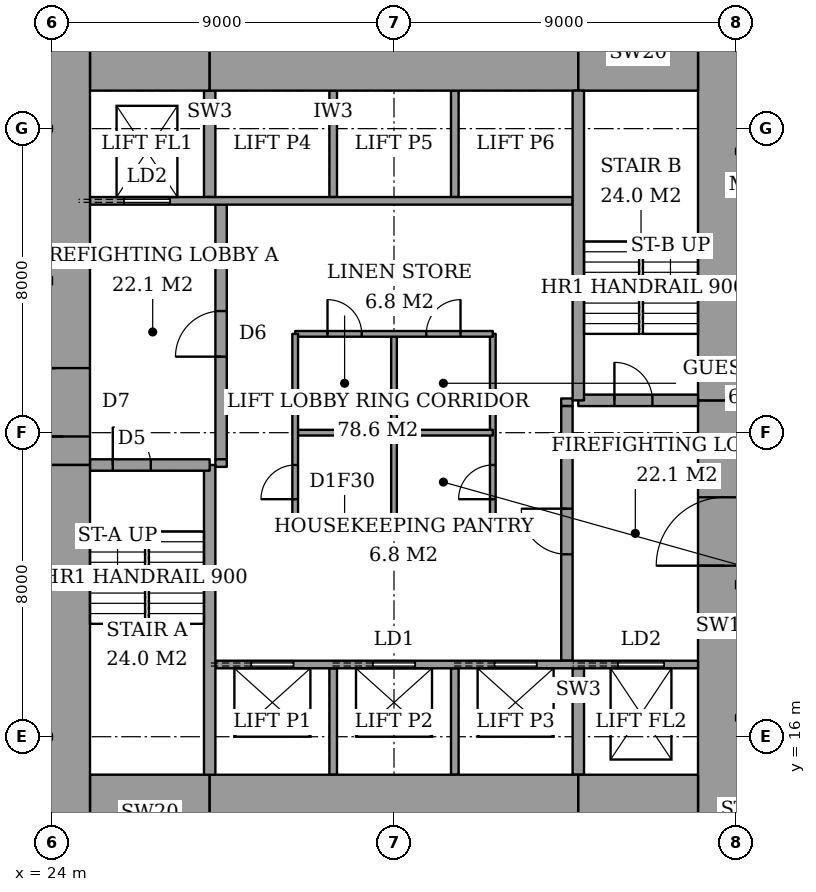
"""IFC4 building model, lengths in metres.
Left out: names, types, materials, properties, quantities, classifications, styles, units other than length and angle.
Written with IfcOpenShell. Run it as: python <this file> out.ifc"""

import sys

from ifc_helpers import new_model, si_unit, direction, frame, frame_2d, origin, place, context, subcontext, project, spatial, rectangle, extrude, element, fill, save


model = new_model("IFC4")
c1 = context("Model", 3, precision=1e-05, world=origin(), true_north=direction((0.0, 1.0)))
c2 = subcontext(c1, "Body", "Model", "MODEL_VIEW")
j1 = project(units=[si_unit("LENGTHUNIT", "METRE"), si_unit("PLANEANGLEUNIT", "RADIAN")], contexts=[c1])
p1 = place(None, origin())
s1 = spatial("IfcSite", under=j1, at=p1, CompositionType="ELEMENT")
p2 = place(p1, origin())
s2 = spatial("IfcBuilding", under=s1, at=p2, CompositionType="ELEMENT")
p3 = place(p2, frame((0.0, 0.0, 139.4)))
s3 = spatial("IfcBuildingStorey", under=s2, at=p3, CompositionType="ELEMENT", Elevation=139.4)
p4 = place(p3, frame((25.0, 14.0, 0.0), z_axis=(0.0, 0.0, 1.0), x_axis=(1.0, 0.0, 0.0)))
e1 = element("IfcWall", 1, at=p4, inside=s3, PredefinedType="SHEAR", context=c2, shape_type="SweptSolid", body=[
    extrude(rectangle(XDim=3.15, YDim=2.0, at=frame_2d((1.575, 0.0))), origin(), (0.0, 0.0, 1.0), 3.6),
])
p5 = place(p3, frame((28.15, 14.0, 0.0), z_axis=(0.0, 0.0, 1.0), x_axis=(1.0, 0.0, 0.0)))
e2 = element("IfcWall", 2, at=p5, inside=s3, PredefinedType="SHEAR", context=c2, shape_type="SweptSolid", body=[
    extrude(rectangle(XDim=9.7, YDim=2.0, at=frame_2d((4.85, 0.0))), origin(), (0.0, 0.0, 1.0), 3.6),
])
for number, where, z_axis, x_axis in (
    (3, (37.85, 14.0, 0.0), (0.0, 0.0, 1.0), (1.0, 0.0, 0.0)),
    (4, (25.0, 34.0, 0.0), (0.0, 0.0, 1.0), (1.0, 0.0, 0.0)),
):
    element("IfcWall", number, at=place(p3, frame(where, z_axis=z_axis, x_axis=x_axis)), inside=s3, PredefinedType="SHEAR", context=c2, shape_type="SweptSolid", body=[
        extrude(rectangle(XDim=3.15, YDim=2.0, at=frame_2d((1.575, 0.0))), origin(), (0.0, 0.0, 1.0), 3.6),
    ])
p6 = place(p3, frame((28.15, 34.0, 0.0), z_axis=(0.0, 0.0, 1.0), x_axis=(1.0, 0.0, 0.0)))
e5 = element("IfcWall", 5, at=p6, inside=s3, PredefinedType="SHEAR", context=c2, shape_type="SweptSolid", body=[
    extrude(rectangle(XDim=9.7, YDim=2.0, at=frame_2d((4.85, 0.0))), origin(), (0.0, 0.0, 1.0), 3.6),
])
p7 = place(p3, frame((37.85, 34.0, 0.0), z_axis=(0.0, 0.0, 1.0), x_axis=(1.0, 0.0, 0.0)))
e6 = element("IfcWall", 6, at=p7, inside=s3, PredefinedType="SHEAR", context=c2, shape_type="SweptSolid", body=[
    extrude(rectangle(XDim=3.15, YDim=2.0, at=frame_2d((1.575, 0.0))), origin(), (0.0, 0.0, 1.0), 3.6),
])
p8 = place(p3, frame((24.3, 13.0, 0.0), z_axis=(0.0, 0.0, 1.0), x_axis=(0.0, 1.0, 0.0)))
e7 = element("IfcWall", 7, at=p8, inside=s3, PredefinedType="SHEAR", context=c2, shape_type="SweptSolid", body=[
    extrude(rectangle(XDim=10.15, YDim=1.4, at=frame_2d((5.075, 0.0))), origin(), (0.0, 0.0, 1.0), 3.6),
])
p9 = place(p3, frame((24.3, 23.15, 0.0), z_axis=(0.0, 0.0, 1.0), x_axis=(0.0, 1.0, 0.0)))
e8 = element("IfcWall", 8, at=p9, inside=s3, PredefinedType="SHEAR", context=c2, shape_type="SweptSolid", body=[
    extrude(rectangle(XDim=11.85, YDim=1.4, at=frame_2d((5.925, 0.0))), origin(), (0.0, 0.0, 1.0), 3.6),
])
p10 = place(p9, frame((0.75, 0.0, 0.0)))
e9 = element("IfcOpeningElement", 9, at=p10, cuts=e8, PredefinedType="OPENING", context=c2, shape_type="SweptSolid", body=[
    extrude(rectangle(XDim=1.8, YDim=2.4, at=frame_2d((0.9, 1.2))), frame((0.0, 0.71, 0.0), z_axis=(0.0, -1.0, 0.0), x_axis=(1.0, 0.0, 0.0)), (0.0, 0.0, 1.0), 1.42),
])
p11 = place(p3, frame((41.7, 13.0, 0.0), z_axis=(0.0, 0.0, 1.0), x_axis=(0.0, 1.0, 0.0)))
e10 = element("IfcWall", 10, at=p11, inside=s3, PredefinedType="SHEAR", context=c2, shape_type="SweptSolid", body=[
    extrude(rectangle(XDim=11.85, YDim=1.4, at=frame_2d((5.925, 0.0))), origin(), (0.0, 0.0, 1.0), 3.6),
])
p12 = place(p11, frame((7.5, 0.0, 0.0)))
e11 = element("IfcOpeningElement", 11, at=p12, cuts=e10, PredefinedType="OPENING", context=c2, shape_type="SweptSolid", body=[
    extrude(rectangle(XDim=1.8, YDim=2.4, at=frame_2d((0.9, 1.2))), frame((0.0, 0.71, 0.0), z_axis=(0.0, -1.0, 0.0), x_axis=(1.0, 0.0, 0.0)), (0.0, 0.0, 1.0), 1.42),
])
p13 = place(p3, frame((41.7, 24.85, 0.0), z_axis=(0.0, 0.0, 1.0), x_axis=(0.0, 1.0, 0.0)))
e12 = element("IfcWall", 12, at=p13, inside=s3, PredefinedType="SHEAR", context=c2, shape_type="SweptSolid", body=[
    extrude(rectangle(XDim=10.15, YDim=1.4, at=frame_2d((5.075, 0.0))), origin(), (0.0, 0.0, 1.0), 3.6),
])
p14 = place(p3, frame((28.15, 15.0, 0.0), z_axis=(0.0, 0.0, 1.0), x_axis=(0.0, 1.0, 0.0)))
e13 = element("IfcWall", 13, at=p14, inside=s3, PredefinedType="SHEAR", context=c2, shape_type="SweptSolid", body=[
    extrude(rectangle(XDim=8.15, YDim=0.3, at=frame_2d((4.075, 0.0))), origin(), (0.0, 0.0, 1.0), 3.6),
])
p15 = place(p3, frame((25.0, 23.15, 0.0), z_axis=(0.0, 0.0, 1.0), x_axis=(1.0, 0.0, 0.0)))
e14 = element("IfcWall", 14, at=p15, inside=s3, PredefinedType="SHEAR", context=c2, shape_type="SweptSolid", body=[
    extrude(rectangle(XDim=3.15, YDim=0.3, at=frame_2d((1.575, 0.0))), origin(), (0.0, 0.0, 1.0), 3.6),
])
p16 = place(p15, frame((0.6, 0.0, 0.0)))
e15 = element("IfcOpeningElement", 15, at=p16, cuts=e14, PredefinedType="OPENING", context=c2, shape_type="SweptSolid", body=[
    extrude(rectangle(XDim=1.0, YDim=2.1, at=frame_2d((0.5, 1.05))), frame((0.0, 0.16, 0.0), z_axis=(0.0, -1.0, 0.0), x_axis=(1.0, 0.0, 0.0)), (0.0, 0.0, 1.0), 0.32),
])
p17 = place(p3, frame((37.85, 24.85, 0.0), z_axis=(0.0, 0.0, 1.0), x_axis=(0.0, 1.0, 0.0)))
e16 = element("IfcWall", 16, at=p17, inside=s3, PredefinedType="SHEAR", context=c2, shape_type="SweptSolid", body=[
    extrude(rectangle(XDim=8.15, YDim=0.3, at=frame_2d((4.075, 0.0))), origin(), (0.0, 0.0, 1.0), 3.6),
])
p18 = place(p3, frame((37.85, 24.85, 0.0), z_axis=(0.0, 0.0, 1.0), x_axis=(1.0, 0.0, 0.0)))
e17 = element("IfcWall", 17, at=p18, inside=s3, PredefinedType="SHEAR", context=c2, shape_type="SweptSolid", body=[
    extrude(rectangle(XDim=3.15, YDim=0.3, at=frame_2d((1.575, 0.0))), origin(), (0.0, 0.0, 1.0), 3.6),
])
p19 = place(p18, frame((0.95, 0.0, 0.0)))
e18 = element("IfcOpeningElement", 18, at=p19, cuts=e17, PredefinedType="OPENING", context=c2, shape_type="SweptSolid", body=[
    extrude(rectangle(XDim=1.0, YDim=2.1, at=frame_2d((0.5, 1.05))), frame((0.0, 0.16, 0.0), z_axis=(0.0, -1.0, 0.0), x_axis=(1.0, 0.0, 0.0)), (0.0, 0.0, 1.0), 0.32),
])
p20 = place(p3, frame((28.45, 23.3, 0.0), z_axis=(0.0, 0.0, 1.0), x_axis=(0.0, 1.0, 0.0)))
e19 = element("IfcWall", 19, at=p20, inside=s3, PredefinedType="PARTITIONING", context=c2, shape_type="SweptSolid", body=[
    extrude(rectangle(XDim=6.7, YDim=0.3, at=frame_2d((3.35, 0.0))), origin(), (0.0, 0.0, 1.0), 3.6),
])
p21 = place(p20, frame((2.7, 0.0, 0.0)))
e20 = element("IfcOpeningElement", 20, at=p21, cuts=e19, PredefinedType="OPENING", context=c2, shape_type="SweptSolid", body=[
    extrude(rectangle(XDim=1.2, YDim=2.1, at=frame_2d((0.6, 1.05))), frame((0.0, 0.16, 0.0), z_axis=(0.0, -1.0, 0.0), x_axis=(1.0, 0.0, 0.0)), (0.0, 0.0, 1.0), 0.32),
])
p22 = place(p3, frame((37.55, 18.0, 0.0), z_axis=(0.0, 0.0, 1.0), x_axis=(0.0, 1.0, 0.0)))
e21 = element("IfcWall", 21, at=p22, inside=s3, PredefinedType="PARTITIONING", context=c2, shape_type="SweptSolid", body=[
    extrude(rectangle(XDim=6.7, YDim=0.3, at=frame_2d((3.35, 0.0))), origin(), (0.0, 0.0, 1.0), 3.6),
])
p23 = place(p22, frame((2.8, 0.0, 0.0)))
e22 = element("IfcOpeningElement", 22, at=p23, cuts=e21, PredefinedType="OPENING", context=c2, shape_type="SweptSolid", body=[
    extrude(rectangle(XDim=1.2, YDim=2.1, at=frame_2d((0.6, 1.05))), frame((0.0, 0.16, 0.0), z_axis=(0.0, -1.0, 0.0), x_axis=(1.0, 0.0, 0.0)), (0.0, 0.0, 1.0), 0.32),
])
p24 = place(p3, frame((28.3, 17.9, 0.0), z_axis=(0.0, 0.0, 1.0), x_axis=(1.0, 0.0, 0.0)))
e23 = element("IfcWall", 23, at=p24, inside=s3, PredefinedType="PARTITIONING", context=c2, shape_type="SweptSolid", body=[
    extrude(rectangle(XDim=12.7, YDim=0.2, at=frame_2d((6.35, 0.0))), origin(), (0.0, 0.0, 1.0), 3.6),
])
p25 = place(p24, frame((0.95, 0.0, 0.0)))
e24 = element("IfcOpeningElement", 24, at=p25, cuts=e23, PredefinedType="OPENING", context=c2, shape_type="SweptSolid", body=[
    extrude(rectangle(XDim=1.1, YDim=2.1, at=frame_2d((0.55, 1.05))), frame((0.0, 0.11, 0.0), z_axis=(0.0, -1.0, 0.0), x_axis=(1.0, 0.0, 0.0)), (0.0, 0.0, 1.0), 0.22),
])
p26 = place(p24, frame((4.15, 0.0, 0.0)))
e25 = element("IfcOpeningElement", 25, at=p26, cuts=e23, PredefinedType="OPENING", context=c2, shape_type="SweptSolid", body=[
    extrude(rectangle(XDim=1.1, YDim=2.1, at=frame_2d((0.55, 1.05))), frame((0.0, 0.11, 0.0), z_axis=(0.0, -1.0, 0.0), x_axis=(1.0, 0.0, 0.0)), (0.0, 0.0, 1.0), 0.22),
])
p27 = place(p24, frame((7.35, 0.0, 0.0)))
e26 = element("IfcOpeningElement", 26, at=p27, cuts=e23, PredefinedType="OPENING", context=c2, shape_type="SweptSolid", body=[
    extrude(rectangle(XDim=1.1, YDim=2.1, at=frame_2d((0.55, 1.05))), frame((0.0, 0.11, 0.0), z_axis=(0.0, -1.0, 0.0), x_axis=(1.0, 0.0, 0.0)), (0.0, 0.0, 1.0), 0.22),
])
p28 = place(p24, frame((10.6, 0.0, 0.0)))
e27 = element("IfcOpeningElement", 27, at=p28, cuts=e23, PredefinedType="OPENING", context=c2, shape_type="SweptSolid", body=[
    extrude(rectangle(XDim=1.2, YDim=2.1, at=frame_2d((0.6, 1.05))), frame((0.0, 0.11, 0.0), z_axis=(0.0, -1.0, 0.0), x_axis=(1.0, 0.0, 0.0)), (0.0, 0.0, 1.0), 0.22),
])
p29 = place(p3, frame((25.0, 30.1, 0.0), z_axis=(0.0, 0.0, 1.0), x_axis=(1.0, 0.0, 0.0)))
e28 = element("IfcWall", 28, at=p29, inside=s3, PredefinedType="PARTITIONING", context=c2, shape_type="SweptSolid", body=[
    extrude(rectangle(XDim=12.7, YDim=0.2, at=frame_2d((6.35, 0.0))), origin(), (0.0, 0.0, 1.0), 3.6),
])
p30 = place(p29, frame((0.9, 0.0, 0.0)))
e29 = element("IfcOpeningElement", 29, at=p30, cuts=e28, PredefinedType="OPENING", context=c2, shape_type="SweptSolid", body=[
    extrude(rectangle(XDim=1.2, YDim=2.1, at=frame_2d((0.6, 1.05))), frame((0.0, 0.11, 0.0), z_axis=(0.0, -1.0, 0.0), x_axis=(1.0, 0.0, 0.0)), (0.0, 0.0, 1.0), 0.22),
])
for number, where, z_axis, x_axis in (
    (30, (31.4, 15.0, 0.0), (0.0, 0.0, 1.0), (0.0, 1.0, 0.0)),
    (31, (34.6, 15.0, 0.0), (0.0, 0.0, 1.0), (0.0, 1.0, 0.0)),
):
    element("IfcWall", number, at=place(p3, frame(where, z_axis=z_axis, x_axis=x_axis)), inside=s3, PredefinedType="PARTITIONING", context=c2, shape_type="SweptSolid", body=[
        extrude(rectangle(XDim=2.8, YDim=0.2, at=frame_2d((1.4, 0.0))), origin(), (0.0, 0.0, 1.0), 3.6),
    ])
p31 = place(p3, frame((37.85, 15.0, 0.0), z_axis=(0.0, 0.0, 1.0), x_axis=(0.0, 1.0, 0.0)))
e32 = element("IfcWall", 32, at=p31, inside=s3, PredefinedType="SHEAR", context=c2, shape_type="SweptSolid", body=[
    extrude(rectangle(XDim=2.8, YDim=0.3, at=frame_2d((1.4, 0.0))), origin(), (0.0, 0.0, 1.0), 3.6),
])
for number, where, z_axis, x_axis in (
    (33, (31.4, 30.2, 0.0), (0.0, 0.0, 1.0), (0.0, 1.0, 0.0)),
    (34, (34.6, 30.2, 0.0), (0.0, 0.0, 1.0), (0.0, 1.0, 0.0)),
):
    element("IfcWall", number, at=place(p3, frame(where, z_axis=z_axis, x_axis=x_axis)), inside=s3, PredefinedType="PARTITIONING", context=c2, shape_type="SweptSolid", body=[
        extrude(rectangle(XDim=2.8, YDim=0.2, at=frame_2d((1.4, 0.0))), origin(), (0.0, 0.0, 1.0), 3.6),
    ])
p32 = place(p3, frame((28.15, 30.2, 0.0), z_axis=(0.0, 0.0, 1.0), x_axis=(0.0, 1.0, 0.0)))
e35 = element("IfcWall", 35, at=p32, inside=s3, PredefinedType="SHEAR", context=c2, shape_type="SweptSolid", body=[
    extrude(rectangle(XDim=2.8, YDim=0.3, at=frame_2d((1.4, 0.0))), origin(), (0.0, 0.0, 1.0), 3.6),
])
for number, where, z_axis, x_axis in (
    (36, (28.3, 23.2, 0.0), (0.0, 0.0, 1.0), (1.0, 0.0, 0.0)),
    (37, (37.4, 24.8, 0.0), (0.0, 0.0, 1.0), (1.0, 0.0, 0.0)),
):
    element("IfcWall", number, at=place(p3, frame(where, z_axis=z_axis, x_axis=x_axis)), inside=s3, PredefinedType="PARTITIONING", context=c2, shape_type="SweptSolid", body=[
        extrude(rectangle(XDim=0.3, YDim=0.2, at=frame_2d((0.15, 0.0))), origin(), (0.0, 0.0, 1.0), 3.6),
    ])
p33 = place(p3, frame((30.4, 21.4, 0.0), z_axis=(0.0, 0.0, 1.0), x_axis=(1.0, 0.0, 0.0)))
e38 = element("IfcWall", 38, at=p33, inside=s3, PredefinedType="PARTITIONING", context=c2, shape_type="SweptSolid", body=[
    extrude(rectangle(XDim=5.2, YDim=0.15, at=frame_2d((2.6, 0.0))), origin(), (0.0, 0.0, 1.0), 3.35),
])
p34 = place(p3, frame((30.4, 26.6, 0.0), z_axis=(0.0, 0.0, 1.0), x_axis=(1.0, 0.0, 0.0)))
e39 = element("IfcWall", 39, at=p34, inside=s3, PredefinedType="PARTITIONING", context=c2, shape_type="SweptSolid", body=[
    extrude(rectangle(XDim=5.2, YDim=0.15, at=frame_2d((2.6, 0.0))), origin(), (0.0, 0.0, 1.0), 3.35),
])
p35 = place(p34, frame((0.85, 0.0, 0.0)))
e40 = element("IfcOpeningElement", 40, at=p35, cuts=e39, PredefinedType="OPENING", context=c2, shape_type="SweptSolid", body=[
    extrude(rectangle(XDim=0.9, YDim=2.1, at=frame_2d((0.45, 1.05))), frame((0.0, 0.085, 0.0), z_axis=(0.0, -1.0, 0.0), x_axis=(1.0, 0.0, 0.0)), (0.0, 0.0, 1.0), 0.17),
])
p36 = place(p34, frame((3.45, 0.0, 0.0)))
e41 = element("IfcOpeningElement", 41, at=p36, cuts=e39, PredefinedType="OPENING", context=c2, shape_type="SweptSolid", body=[
    extrude(rectangle(XDim=0.9, YDim=2.1, at=frame_2d((0.45, 1.05))), frame((0.0, 0.085, 0.0), z_axis=(0.0, -1.0, 0.0), x_axis=(1.0, 0.0, 0.0)), (0.0, 0.0, 1.0), 0.17),
])
p37 = place(p3, frame((30.4, 21.4, 0.0), z_axis=(0.0, 0.0, 1.0), x_axis=(0.0, 1.0, 0.0)))
e42 = element("IfcWall", 42, at=p37, inside=s3, PredefinedType="PARTITIONING", context=c2, shape_type="SweptSolid", body=[
    extrude(rectangle(XDim=5.2, YDim=0.15, at=frame_2d((2.6, 0.0))), origin(), (0.0, 0.0, 1.0), 3.35),
])
p38 = place(p37, frame((0.85, 0.0, 0.0)))
e43 = element("IfcOpeningElement", 43, at=p38, cuts=e42, PredefinedType="OPENING", context=c2, shape_type="SweptSolid", body=[
    extrude(rectangle(XDim=0.9, YDim=2.1, at=frame_2d((0.45, 1.05))), frame((0.0, 0.085, 0.0), z_axis=(0.0, -1.0, 0.0), x_axis=(1.0, 0.0, 0.0)), (0.0, 0.0, 1.0), 0.17),
])
p39 = place(p3, frame((35.6, 21.4, 0.0), z_axis=(0.0, 0.0, 1.0), x_axis=(0.0, 1.0, 0.0)))
e44 = element("IfcWall", 44, at=p39, inside=s3, PredefinedType="PARTITIONING", context=c2, shape_type="SweptSolid", body=[
    extrude(rectangle(XDim=5.2, YDim=0.15, at=frame_2d((2.6, 0.0))), origin(), (0.0, 0.0, 1.0), 3.35),
])
p40 = place(p39, frame((0.85, 0.0, 0.0)))
e45 = element("IfcOpeningElement", 45, at=p40, cuts=e44, PredefinedType="OPENING", context=c2, shape_type="SweptSolid", body=[
    extrude(rectangle(XDim=0.9, YDim=2.1, at=frame_2d((0.45, 1.05))), frame((0.0, 0.085, 0.0), z_axis=(0.0, -1.0, 0.0), x_axis=(1.0, 0.0, 0.0)), (0.0, 0.0, 1.0), 0.17),
])
for number, where, z_axis, x_axis in (
    (46, (30.4, 24.0, 0.0), (0.0, 0.0, 1.0), (1.0, 0.0, 0.0)),
    (47, (33.0, 21.4, 0.0), (0.0, 0.0, 1.0), (0.0, 1.0, 0.0)),
):
    element("IfcWall", number, at=place(p3, frame(where, z_axis=z_axis, x_axis=x_axis)), inside=s3, PredefinedType="PARTITIONING", context=c2, shape_type="SweptSolid", body=[
        extrude(rectangle(XDim=5.2, YDim=0.15, at=frame_2d((2.6, 0.0))), origin(), (0.0, 0.0, 1.0), 3.35),
    ])
p41 = place(p16, origin())
e48 = element("IfcDoor", 48, at=p41, inside=s3, OperationType="SINGLE_SWING_RIGHT", PredefinedType="DOOR", context=c2, shape_type="SweptSolid", body=[
    extrude(rectangle(XDim=1.0, YDim=2.1, at=frame_2d((0.5, 1.05))), frame((0.0, 0.025, 0.0), z_axis=(0.0, -1.0, 0.0), x_axis=(1.0, 0.0, 0.0)), (0.0, 0.0, 1.0), 0.05),
])
fill(e15, e48)
p42 = place(p19, origin())
e49 = element("IfcDoor", 49, at=p42, inside=s3, OperationType="SINGLE_SWING_RIGHT", PredefinedType="DOOR", context=c2, shape_type="SweptSolid", body=[
    extrude(rectangle(XDim=1.0, YDim=2.1, at=frame_2d((0.5, 1.05))), frame((0.0, 0.025, 0.0), z_axis=(0.0, -1.0, 0.0), x_axis=(1.0, 0.0, 0.0)), (0.0, 0.0, 1.0), 0.05),
])
fill(e18, e49)
p43 = place(p21, origin())
e50 = element("IfcDoor", 50, at=p43, inside=s3, OperationType="SINGLE_SWING_RIGHT", PredefinedType="DOOR", context=c2, shape_type="SweptSolid", body=[
    extrude(rectangle(XDim=1.2, YDim=2.1, at=frame_2d((0.6, 1.05))), frame((0.0, 0.025, 0.0), z_axis=(0.0, -1.0, 0.0), x_axis=(1.0, 0.0, 0.0)), (0.0, 0.0, 1.0), 0.05),
])
fill(e20, e50)
p44 = place(p23, origin())
e51 = element("IfcDoor", 51, at=p44, inside=s3, OperationType="SINGLE_SWING_LEFT", PredefinedType="DOOR", context=c2, shape_type="SweptSolid", body=[
    extrude(rectangle(XDim=1.2, YDim=2.1, at=frame_2d((0.6, 1.05))), frame((0.0, 0.025, 0.0), z_axis=(0.0, -1.0, 0.0), x_axis=(1.0, 0.0, 0.0)), (0.0, 0.0, 1.0), 0.05),
])
fill(e22, e51)
p45 = place(p10, origin())
e52 = element("IfcDoor", 52, at=p45, inside=s3, OperationType="DOUBLE_DOOR_DOUBLE_SWING", PredefinedType="DOOR", context=c2, shape_type="SweptSolid", body=[
    extrude(rectangle(XDim=1.8, YDim=2.4, at=frame_2d((0.9, 1.2))), frame((0.0, 0.025, 0.0), z_axis=(0.0, -1.0, 0.0), x_axis=(1.0, 0.0, 0.0)), (0.0, 0.0, 1.0), 0.05),
])
fill(e9, e52)
p46 = place(p12, origin())
e53 = element("IfcDoor", 53, at=p46, inside=s3, OperationType="DOUBLE_DOOR_DOUBLE_SWING", PredefinedType="DOOR", context=c2, shape_type="SweptSolid", body=[
    extrude(rectangle(XDim=1.8, YDim=2.4, at=frame_2d((0.9, 1.2))), frame((0.0, 0.025, 0.0), z_axis=(0.0, -1.0, 0.0), x_axis=(1.0, 0.0, 0.0)), (0.0, 0.0, 1.0), 0.05),
])
fill(e11, e53)
p47 = place(p38, origin())
e54 = element("IfcDoor", 54, at=p47, inside=s3, OperationType="SINGLE_SWING_RIGHT", PredefinedType="DOOR", context=c2, shape_type="SweptSolid", body=[
    extrude(rectangle(XDim=0.9, YDim=2.1, at=frame_2d((0.45, 1.05))), frame((0.0, 0.025, 0.0), z_axis=(0.0, -1.0, 0.0), x_axis=(1.0, 0.0, 0.0)), (0.0, 0.0, 1.0), 0.05),
])
fill(e43, e54)
p48 = place(p40, origin())
e55 = element("IfcDoor", 55, at=p48, inside=s3, OperationType="SINGLE_SWING_RIGHT", PredefinedType="DOOR", context=c2, shape_type="SweptSolid", body=[
    extrude(rectangle(XDim=0.9, YDim=2.1, at=frame_2d((0.45, 1.05))), frame((0.0, 0.025, 0.0), z_axis=(0.0, -1.0, 0.0), x_axis=(1.0, 0.0, 0.0)), (0.0, 0.0, 1.0), 0.05),
])
fill(e45, e55)
p49 = place(p35, origin())
e56 = element("IfcDoor", 56, at=p49, inside=s3, OperationType="SINGLE_SWING_RIGHT", PredefinedType="DOOR", context=c2, shape_type="SweptSolid", body=[
    extrude(rectangle(XDim=0.9, YDim=2.1, at=frame_2d((0.45, 1.05))), frame((0.0, 0.025, 0.0), z_axis=(0.0, -1.0, 0.0), x_axis=(1.0, 0.0, 0.0)), (0.0, 0.0, 1.0), 0.05),
])
fill(e40, e56)
p50 = place(p36, origin())
e57 = element("IfcDoor", 57, at=p50, inside=s3, OperationType="SINGLE_SWING_LEFT", PredefinedType="DOOR", context=c2, shape_type="SweptSolid", body=[
    extrude(rectangle(XDim=0.9, YDim=2.1, at=frame_2d((0.45, 1.05))), frame((0.0, 0.025, 0.0), z_axis=(0.0, -1.0, 0.0), x_axis=(1.0, 0.0, 0.0)), (0.0, 0.0, 1.0), 0.05),
])
fill(e41, e57)
p51 = place(p25, origin())
e58 = element("IfcDoor", 58, at=p51, inside=s3, OperationType="SLIDING_TO_LEFT", PredefinedType="DOOR", context=c2, shape_type="SweptSolid", body=[
    extrude(rectangle(XDim=1.1, YDim=2.1, at=frame_2d((0.55, 1.05))), frame((0.0, 0.025, 0.0), z_axis=(0.0, -1.0, 0.0), x_axis=(1.0, 0.0, 0.0)), (0.0, 0.0, 1.0), 0.05),
])
fill(e24, e58)
p52 = place(p26, origin())
e59 = element("IfcDoor", 59, at=p52, inside=s3, OperationType="SLIDING_TO_LEFT", PredefinedType="DOOR", context=c2, shape_type="SweptSolid", body=[
    extrude(rectangle(XDim=1.1, YDim=2.1, at=frame_2d((0.55, 1.05))), frame((0.0, 0.025, 0.0), z_axis=(0.0, -1.0, 0.0), x_axis=(1.0, 0.0, 0.0)), (0.0, 0.0, 1.0), 0.05),
])
fill(e25, e59)
p53 = place(p27, origin())
e60 = element("IfcDoor", 60, at=p53, inside=s3, OperationType="SLIDING_TO_LEFT", PredefinedType="DOOR", context=c2, shape_type="SweptSolid", body=[
    extrude(rectangle(XDim=1.1, YDim=2.1, at=frame_2d((0.55, 1.05))), frame((0.0, 0.025, 0.0), z_axis=(0.0, -1.0, 0.0), x_axis=(1.0, 0.0, 0.0)), (0.0, 0.0, 1.0), 0.05),
])
fill(e26, e60)
p54 = place(p30, origin())
e61 = element("IfcDoor", 61, at=p54, inside=s3, OperationType="SLIDING_TO_LEFT", PredefinedType="DOOR", context=c2, shape_type="SweptSolid", body=[
    extrude(rectangle(XDim=1.2, YDim=2.1, at=frame_2d((0.6, 1.05))), frame((0.0, 0.025, 0.0), z_axis=(0.0, -1.0, 0.0), x_axis=(1.0, 0.0, 0.0)), (0.0, 0.0, 1.0), 0.05),
])
fill(e29, e61)
p55 = place(p28, origin())
e62 = element("IfcDoor", 62, at=p55, inside=s3, OperationType="SLIDING_TO_LEFT", PredefinedType="DOOR", context=c2, shape_type="SweptSolid", body=[
    extrude(rectangle(XDim=1.2, YDim=2.1, at=frame_2d((0.6, 1.05))), frame((0.0, 0.025, 0.0), z_axis=(0.0, -1.0, 0.0), x_axis=(1.0, 0.0, 0.0)), (0.0, 0.0, 1.0), 0.05),
])
fill(e27, e62)
save(model, sys.argv[1])
